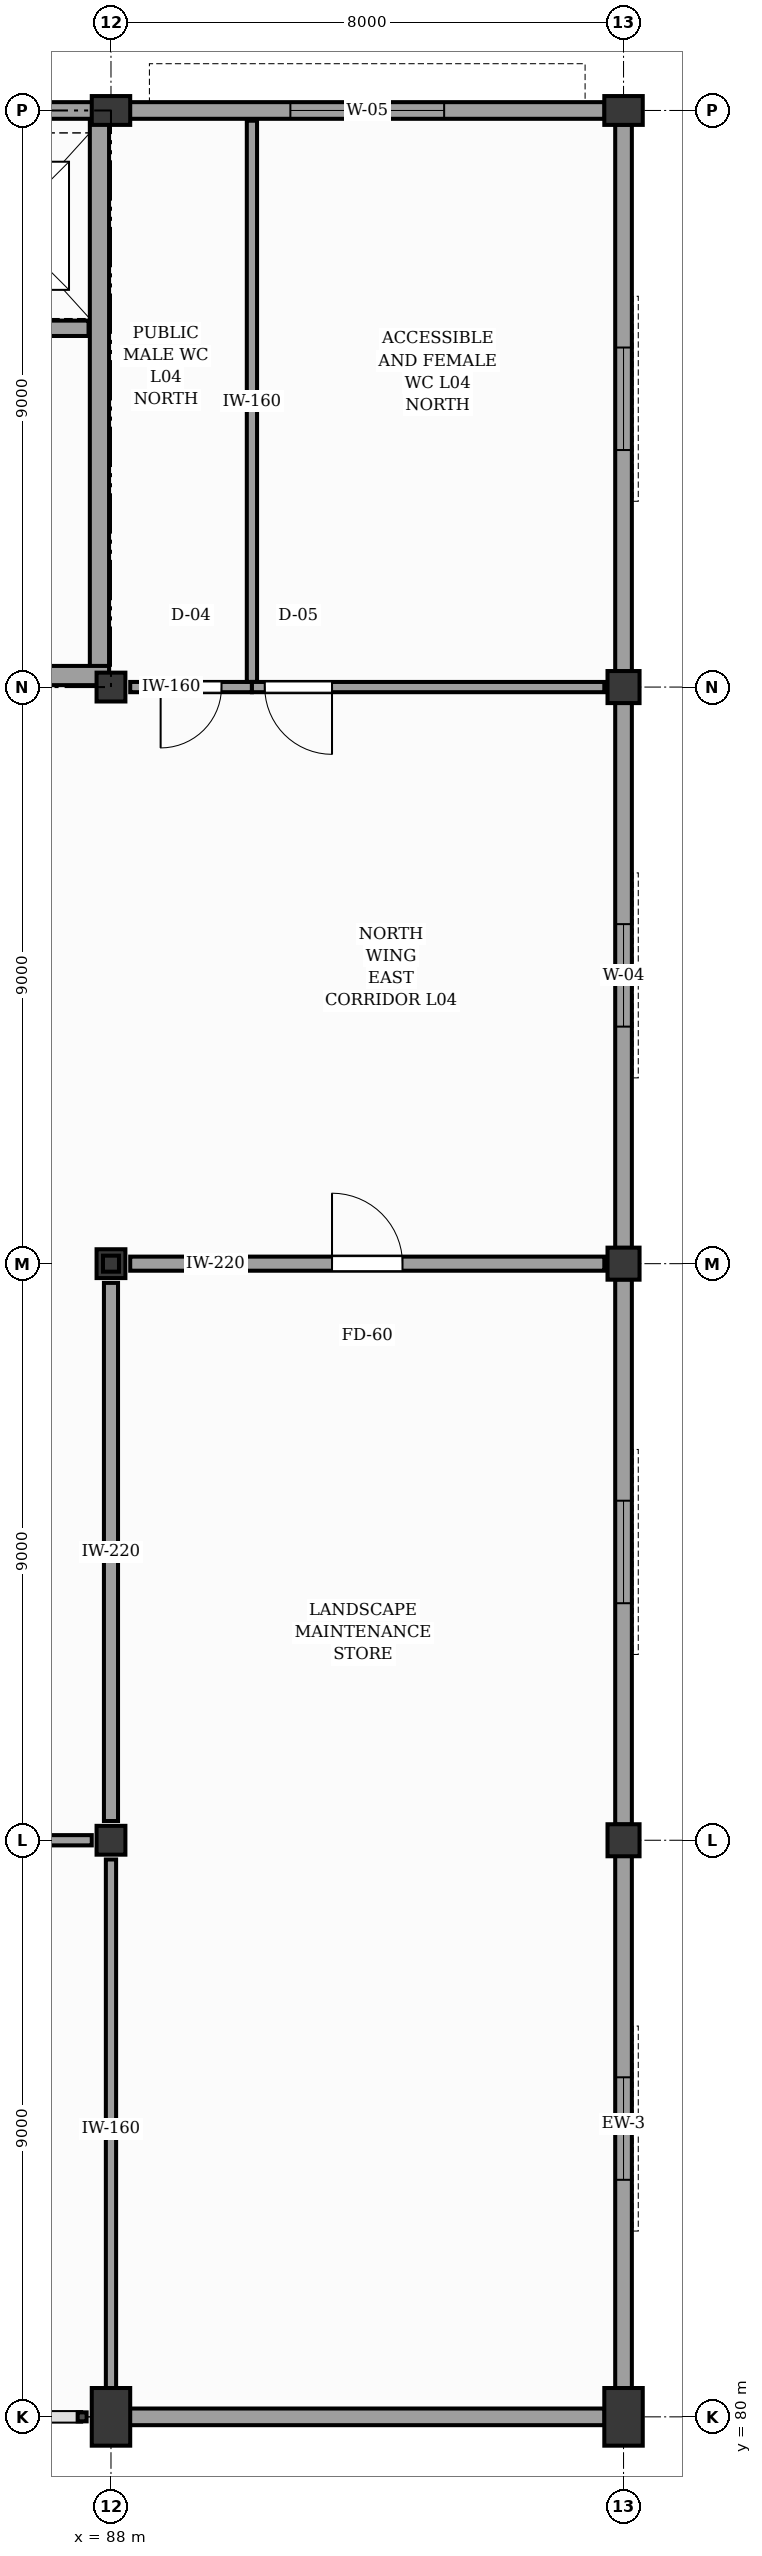
"""IFC4 building model, lengths in metres.
Left out: names, types, materials, properties, quantities, classifications, styles, units other than length and angle.
Written with IfcOpenShell. Run it as: python <this file> out.ifc"""

import sys

from ifc_helpers import new_model, si_unit, direction, frame, frame_2d, origin, origin_2d, place, context, subcontext, project, spatial, rectangle, i_section, extrude, element, fill, save


model = new_model("IFC4")
c1 = context("Model", 3, precision=1e-05, world=origin(), true_north=direction((0.0, 1.0)))
c2 = subcontext(c1, "Body", "Model", "MODEL_VIEW")
j1 = project(units=[si_unit("LENGTHUNIT", "METRE"), si_unit("PLANEANGLEUNIT", "RADIAN")], contexts=[c1])
p1 = place(None, origin())
s1 = spatial("IfcSite", under=j1, at=p1, CompositionType="ELEMENT")
p2 = place(p1, origin())
s2 = spatial("IfcBuilding", under=s1, at=p2, CompositionType="ELEMENT")
p3 = place(p2, frame((0.0, 0.0, 20.4)))
s3 = spatial("IfcBuildingStorey", under=s2, at=p3, CompositionType="ELEMENT", Elevation=20.4)
p4 = place(p3, frame((88.0, 80.0, 0.0), z_axis=(0.0, 0.0, 1.0), x_axis=(1.0, 0.0, 0.0)))
e1 = element("IfcColumn", 1, at=p4, inside=s3, PredefinedType="COLUMN", context=c2, shape_type="SweptSolid", body=[
    extrude(rectangle(XDim=0.6, YDim=0.9, at=origin_2d()), origin(), (0.0, 0.0, 1.0), 4.2),
])
for number, where, z_axis, x_axis in (
    (2, (88.0, 89.0, 0.0), (0.0, 0.0, 1.0), (1.0, 0.0, 0.0)),
    (3, (88.0, 98.0, 0.0), (0.0, 0.0, 1.0), (1.0, 0.0, 0.0)),
    (4, (88.0, 107.0, 0.0), (0.0, 0.0, 1.0), (1.0, 0.0, 0.0)),
):
    element("IfcColumn", number, at=place(p3, frame(where, z_axis=z_axis, x_axis=x_axis)), inside=s3, PredefinedType="COLUMN", context=c2, shape_type="SweptSolid", body=[
        extrude(rectangle(XDim=0.45, YDim=0.45, at=origin_2d()), origin(), (0.0, 0.0, 1.0), 4.2),
    ])
p5 = place(p3, frame((88.0, 116.0, 0.0), z_axis=(0.0, 0.0, 1.0), x_axis=(1.0, 0.0, 0.0)))
e5 = element("IfcColumn", 5, at=p5, inside=s3, PredefinedType="PILASTER", context=c2, shape_type="SweptSolid", body=[
    extrude(rectangle(XDim=0.6, YDim=0.45, at=origin_2d()), origin(), (0.0, 0.0, 1.0), 4.2),
])
p6 = place(p3, frame((96.0, 80.0, 0.0), z_axis=(0.0, 0.0, 1.0), x_axis=(1.0, 0.0, 0.0)))
e6 = element("IfcColumn", 6, at=p6, inside=s3, PredefinedType="COLUMN", context=c2, shape_type="SweptSolid", body=[
    extrude(rectangle(XDim=0.6, YDim=0.9, at=origin_2d()), origin(), (0.0, 0.0, 1.0), 4.2),
])
for number, where, z_axis, x_axis in (
    (7, (96.0, 89.0, 0.0), (0.0, 0.0, 1.0), (1.0, 0.0, 0.0)),
    (8, (96.0, 98.0, 0.0), (0.0, 0.0, 1.0), (1.0, 0.0, 0.0)),
    (9, (96.0, 107.0, 0.0), (0.0, 0.0, 1.0), (1.0, 0.0, 0.0)),
):
    element("IfcColumn", number, at=place(p3, frame(where, z_axis=z_axis, x_axis=x_axis)), inside=s3, PredefinedType="COLUMN", context=c2, shape_type="SweptSolid", body=[
        extrude(rectangle(XDim=0.5, YDim=0.5, at=origin_2d()), origin(), (0.0, 0.0, 1.0), 4.2),
    ])
p7 = place(p3, frame((96.0, 116.0, 0.0), z_axis=(0.0, 0.0, 1.0), x_axis=(1.0, 0.0, 0.0)))
e10 = element("IfcColumn", 10, at=p7, inside=s3, PredefinedType="PILASTER", context=c2, shape_type="SweptSolid", body=[
    extrude(rectangle(XDim=0.6, YDim=0.45, at=origin_2d()), origin(), (0.0, 0.0, 1.0), 4.2),
])
p8 = place(p3, frame((88.0, 98.0, 4.2), z_axis=(0.0, 0.0, 1.0), x_axis=(1.0, 0.0, 0.0)))
e11 = element("IfcColumn", 11, at=p8, inside=s3, PredefinedType="COLUMN", context=c2, shape_type="SweptSolid", body=[
    extrude(i_section(OverallWidth=0.25, OverallDepth=0.25, WebThickness=0.009, FlangeThickness=0.01, FilletRadius=0.01, at=origin_2d()), origin(), (0.0, 0.0, 1.0), 3.5),
])
p9 = place(p3, frame((80.295, 116.0, 0.0), z_axis=(0.0, 0.0, 1.0), x_axis=(1.0, 0.0, 0.0)))
e12 = element("IfcWall", 12, at=p9, inside=s3, PredefinedType="SOLIDWALL", context=c2, shape_type="SweptSolid", body=[
    extrude(rectangle(XDim=7.41, YDim=0.26, at=frame_2d((3.705, 0.0))), origin(), (0.0, 0.0, 1.0), 3.21),
])
p10 = place(p3, frame((88.295, 116.0, 0.0), z_axis=(0.0, 0.0, 1.0), x_axis=(1.0, 0.0, 0.0)))
e13 = element("IfcWall", 13, at=p10, inside=s3, PredefinedType="SOLIDWALL", context=c2, shape_type="SweptSolid", body=[
    extrude(rectangle(XDim=7.41, YDim=0.26, at=frame_2d((3.705, 0.0))), origin(), (0.0, 0.0, 1.0), 3.21),
])
p11 = place(p10, frame((2.505, 0.0, 0.9)))
e14 = element("IfcOpeningElement", 14, at=p11, cuts=e13, PredefinedType="OPENING", context=c2, shape_type="SweptSolid", body=[
    extrude(rectangle(XDim=2.4, YDim=1.99, at=frame_2d((1.2, 0.995))), frame((0.0, 0.14, 0.0), z_axis=(0.0, -1.0, 0.0), x_axis=(1.0, 0.0, 0.0)), (0.0, 0.0, 1.0), 0.28),
])
p12 = place(p3, frame((88.295, 80.0, 0.0), z_axis=(0.0, 0.0, 1.0), x_axis=(1.0, 0.0, 0.0)))
e15 = element("IfcWall", 15, at=p12, inside=s3, PredefinedType="SOLIDWALL", context=c2, shape_type="SweptSolid", body=[
    extrude(rectangle(XDim=7.41, YDim=0.26, at=frame_2d((3.705, 0.0))), origin(), (0.0, 0.0, 1.0), 2.96),
])
p13 = place(p3, frame((96.0, 80.4, 0.0), z_axis=(0.0, 0.0, 1.0), x_axis=(0.0, 1.0, 0.0)))
e16 = element("IfcWall", 16, at=p13, inside=s3, PredefinedType="SOLIDWALL", context=c2, shape_type="SweptSolid", body=[
    extrude(rectangle(XDim=8.355, YDim=0.26, at=frame_2d((4.177, 0.0))), origin(), (0.0, 0.0, 1.0), 2.96),
])
p14 = place(p13, frame((3.3, 0.0, 0.95)))
e17 = element("IfcOpeningElement", 17, at=p14, cuts=e16, PredefinedType="OPENING", context=c2, shape_type="SweptSolid", body=[
    extrude(rectangle(XDim=1.6, YDim=1.87, at=frame_2d((0.8, 0.935))), frame((0.0, 0.14, 0.0), z_axis=(0.0, -1.0, 0.0), x_axis=(1.0, 0.0, 0.0)), (0.0, 0.0, 1.0), 0.28),
])
p15 = place(p3, frame((96.0, 89.245, 0.0), z_axis=(0.0, 0.0, 1.0), x_axis=(0.0, 1.0, 0.0)))
e18 = element("IfcWall", 18, at=p15, inside=s3, PredefinedType="SOLIDWALL", context=c2, shape_type="SweptSolid", body=[
    extrude(rectangle(XDim=8.51, YDim=0.26, at=frame_2d((4.255, 0.0))), origin(), (0.0, 0.0, 1.0), 3.21),
])
p16 = place(p15, frame((3.455, 0.0, 0.95)))
e19 = element("IfcOpeningElement", 19, at=p16, cuts=e18, PredefinedType="OPENING", context=c2, shape_type="SweptSolid", body=[
    extrude(rectangle(XDim=1.6, YDim=2.1, at=frame_2d((0.8, 1.05))), frame((0.0, 0.14, 0.0), z_axis=(0.0, -1.0, 0.0), x_axis=(1.0, 0.0, 0.0)), (0.0, 0.0, 1.0), 0.28),
])
p17 = place(p3, frame((96.0, 98.245, 0.0), z_axis=(0.0, 0.0, 1.0), x_axis=(0.0, 1.0, 0.0)))
e20 = element("IfcWall", 20, at=p17, inside=s3, PredefinedType="SOLIDWALL", context=c2, shape_type="SweptSolid", body=[
    extrude(rectangle(XDim=8.51, YDim=0.26, at=frame_2d((4.255, 0.0))), origin(), (0.0, 0.0, 1.0), 3.21),
])
p18 = place(p17, frame((3.455, 0.0, 0.95)))
e21 = element("IfcOpeningElement", 21, at=p18, cuts=e20, PredefinedType="OPENING", context=c2, shape_type="SweptSolid", body=[
    extrude(rectangle(XDim=1.6, YDim=2.1, at=frame_2d((0.8, 1.05))), frame((0.0, 0.14, 0.0), z_axis=(0.0, -1.0, 0.0), x_axis=(1.0, 0.0, 0.0)), (0.0, 0.0, 1.0), 0.28),
])
p19 = place(p3, frame((96.0, 107.245, 0.0), z_axis=(0.0, 0.0, 1.0), x_axis=(0.0, 1.0, 0.0)))
e22 = element("IfcWall", 22, at=p19, inside=s3, PredefinedType="SOLIDWALL", context=c2, shape_type="SweptSolid", body=[
    extrude(rectangle(XDim=8.535, YDim=0.26, at=frame_2d((4.268, 0.0))), origin(), (0.0, 0.0, 1.0), 3.21),
])
p20 = place(p19, frame((3.455, 0.0, 0.95)))
e23 = element("IfcOpeningElement", 23, at=p20, cuts=e22, PredefinedType="OPENING", context=c2, shape_type="SweptSolid", body=[
    extrude(rectangle(XDim=1.6, YDim=2.1, at=frame_2d((0.8, 1.05))), frame((0.0, 0.14, 0.0), z_axis=(0.0, -1.0, 0.0), x_axis=(1.0, 0.0, 0.0)), (0.0, 0.0, 1.0), 0.28),
])
p21 = place(p3, frame((85.02, 112.6, 0.0), z_axis=(0.0, 0.0, 1.0), x_axis=(1.0, 0.0, 0.0)))
e24 = element("IfcWall", 24, at=p21, inside=s3, PredefinedType="SHEAR", context=c2, shape_type="SweptSolid", body=[
    extrude(rectangle(XDim=2.63, YDim=0.24, at=frame_2d((1.315, 0.0))), origin(), (0.0, 0.0, 1.0), 3.98),
])
p22 = place(p21, frame((0.765, 0.0, 0.0)))
e25 = element("IfcOpeningElement", 25, at=p22, cuts=e24, PredefinedType="OPENING", context=c2, shape_type="SweptSolid", body=[
    extrude(rectangle(XDim=1.1, YDim=2.15, at=frame_2d((0.55, 1.075))), frame((0.0, 0.13, 0.0), z_axis=(0.0, -1.0, 0.0), x_axis=(1.0, 0.0, 0.0)), (0.0, 0.0, 1.0), 0.26),
])
p23 = place(p3, frame((87.82, 107.18, 0.0), z_axis=(0.0, 0.0, 1.0), x_axis=(0.0, 1.0, 0.0)))
e26 = element("IfcWall", 26, at=p23, inside=s3, PredefinedType="SHEAR", context=c2, shape_type="SweptSolid", body=[
    extrude(rectangle(XDim=8.64, YDim=0.3, at=frame_2d((4.32, 0.0))), origin(), (0.0, 0.0, 1.0), 3.98),
])
p24 = place(p3, frame((80.03, 107.18, 0.0), z_axis=(0.0, 0.0, 1.0), x_axis=(1.0, 0.0, 0.0)))
e27 = element("IfcWall", 27, at=p24, inside=s3, PredefinedType="SHEAR", context=c2, shape_type="SweptSolid", body=[
    extrude(rectangle(XDim=7.94, YDim=0.3, at=frame_2d((3.97, 0.0))), origin(), (0.0, 0.0, 1.0), 3.98),
])
p25 = place(p24, frame((5.35, 0.0, 0.0)))
e28 = element("IfcOpeningElement", 28, at=p25, cuts=e27, PredefinedType="OPENING", context=c2, shape_type="SweptSolid", body=[
    extrude(rectangle(XDim=1.6, YDim=2.15, at=frame_2d((0.8, 1.075))), frame((0.0, 0.16, 0.0), z_axis=(0.0, -1.0, 0.0), x_axis=(1.0, 0.0, 0.0)), (0.0, 0.0, 1.0), 0.32),
])
p26 = place(p3, frame((80.3, 89.0, 0.0), z_axis=(0.0, 0.0, 1.0), x_axis=(1.0, 0.0, 0.0)))
e29 = element("IfcWall", 29, at=p26, inside=s3, PredefinedType="PARTITIONING", context=c2, shape_type="SweptSolid", body=[
    extrude(rectangle(XDim=7.4, YDim=0.16, at=frame_2d((3.7, 0.0))), origin(), (0.0, 0.0, 1.0), 3.1),
])
p27 = place(p26, frame((2.8, 0.0, 0.0)))
e30 = element("IfcOpeningElement", 30, at=p27, cuts=e29, PredefinedType="OPENING", context=c2, shape_type="SweptSolid", body=[
    extrude(rectangle(XDim=1.8, YDim=2.25, at=frame_2d((0.9, 1.125))), frame((0.0, 0.09, 0.0), z_axis=(0.0, -1.0, 0.0), x_axis=(1.0, 0.0, 0.0)), (0.0, 0.0, 1.0), 0.18),
])
p28 = place(p3, frame((88.0, 80.3, 0.0), z_axis=(0.0, 0.0, 1.0), x_axis=(0.0, 1.0, 0.0)))
e31 = element("IfcWall", 31, at=p28, inside=s3, PredefinedType="PARTITIONING", context=c2, shape_type="SweptSolid", body=[
    extrude(rectangle(XDim=8.4, YDim=0.16, at=frame_2d((4.2, 0.0))), origin(), (0.0, 0.0, 1.0), 2.96),
])
p29 = place(p3, frame((88.3, 107.0, 0.0), z_axis=(0.0, 0.0, 1.0), x_axis=(1.0, 0.0, 0.0)))
e32 = element("IfcWall", 32, at=p29, inside=s3, PredefinedType="PARTITIONING", context=c2, shape_type="SweptSolid", body=[
    extrude(rectangle(XDim=1.9, YDim=0.16, at=frame_2d((0.95, 0.0))), origin(), (0.0, 0.0, 1.0), 3.1),
])
p30 = place(p29, frame((0.475, 0.0, 0.0)))
e33 = element("IfcOpeningElement", 33, at=p30, cuts=e32, PredefinedType="OPENING", context=c2, shape_type="SweptSolid", body=[
    extrude(rectangle(XDim=0.95, YDim=2.1, at=frame_2d((0.475, 1.05))), frame((0.0, 0.09, 0.0), z_axis=(0.0, -1.0, 0.0), x_axis=(1.0, 0.0, 0.0)), (0.0, 0.0, 1.0), 0.18),
])
p31 = place(p3, frame((90.2, 107.08, 0.0), z_axis=(0.0, 0.0, 1.0), x_axis=(0.0, 1.0, 0.0)))
e34 = element("IfcWall", 34, at=p31, inside=s3, PredefinedType="PARTITIONING", context=c2, shape_type="SweptSolid", body=[
    extrude(rectangle(XDim=8.76, YDim=0.16, at=frame_2d((4.38, 0.0))), origin(), (0.0, 0.0, 1.0), 3.1),
])
p32 = place(p3, frame((90.2, 107.0, 0.0), z_axis=(0.0, 0.0, 1.0), x_axis=(1.0, 0.0, 0.0)))
e35 = element("IfcWall", 35, at=p32, inside=s3, PredefinedType="PARTITIONING", context=c2, shape_type="SweptSolid", body=[
    extrude(rectangle(XDim=5.5, YDim=0.16, at=frame_2d((2.75, 0.0))), origin(), (0.0, 0.0, 1.0), 3.1),
])
p33 = place(p32, frame((0.2, 0.0, 0.0)))
e36 = element("IfcOpeningElement", 36, at=p33, cuts=e35, PredefinedType="OPENING", context=c2, shape_type="SweptSolid", body=[
    extrude(rectangle(XDim=1.05, YDim=2.1, at=frame_2d((0.525, 1.05))), frame((0.0, 0.09, 0.0), z_axis=(0.0, -1.0, 0.0), x_axis=(1.0, 0.0, 0.0)), (0.0, 0.0, 1.0), 0.18),
])
p34 = place(p3, frame((88.3, 98.0, 0.0), z_axis=(0.0, 0.0, 1.0), x_axis=(1.0, 0.0, 0.0)))
e37 = element("IfcWall", 37, at=p34, inside=s3, PredefinedType="SOLIDWALL", context=c2, shape_type="SweptSolid", body=[
    extrude(rectangle(XDim=7.4, YDim=0.22, at=frame_2d((3.7, 0.0))), origin(), (0.0, 0.0, 1.0), 3.1),
])
p35 = place(p34, frame((3.15, 0.0, 0.0)))
e38 = element("IfcOpeningElement", 38, at=p35, cuts=e37, PredefinedType="OPENING", context=c2, shape_type="SweptSolid", body=[
    extrude(rectangle(XDim=1.1, YDim=2.15, at=frame_2d((0.55, 1.075))), frame((0.0, 0.12, 0.0), z_axis=(0.0, -1.0, 0.0), x_axis=(1.0, 0.0, 0.0)), (0.0, 0.0, 1.0), 0.24),
])
p36 = place(p3, frame((88.0, 89.3, 0.0), z_axis=(0.0, 0.0, 1.0), x_axis=(0.0, 1.0, 0.0)))
e39 = element("IfcWall", 39, at=p36, inside=s3, PredefinedType="SOLIDWALL", context=c2, shape_type="SweptSolid", body=[
    extrude(rectangle(XDim=8.4, YDim=0.22, at=frame_2d((4.2, 0.0))), origin(), (0.0, 0.0, 1.0), 3.1),
])
p37 = place(p11, origin())
e40 = element("IfcWindow", 40, at=p37, inside=s3, PartitioningType="SINGLE_PANEL", PredefinedType="WINDOW", context=c2, shape_type="SweptSolid", body=[
    extrude(rectangle(XDim=2.4, YDim=1.99, at=frame_2d((1.2, 0.995))), frame((0.0, 0.03, 0.0), z_axis=(0.0, -1.0, 0.0), x_axis=(1.0, 0.0, 0.0)), (0.0, 0.0, 1.0), 0.06),
])
fill(e14, e40)
p38 = place(p14, origin())
e41 = element("IfcWindow", 41, at=p38, inside=s3, PartitioningType="SINGLE_PANEL", PredefinedType="WINDOW", context=c2, shape_type="SweptSolid", body=[
    extrude(rectangle(XDim=1.6, YDim=1.87, at=frame_2d((0.8, 0.935))), frame((0.0, 0.03, 0.0), z_axis=(0.0, -1.0, 0.0), x_axis=(1.0, 0.0, 0.0)), (0.0, 0.0, 1.0), 0.06),
])
fill(e17, e41)
p39 = place(p16, origin())
e42 = element("IfcWindow", 42, at=p39, inside=s3, PartitioningType="SINGLE_PANEL", PredefinedType="WINDOW", context=c2, shape_type="SweptSolid", body=[
    extrude(rectangle(XDim=1.6, YDim=2.1, at=frame_2d((0.8, 1.05))), frame((0.0, 0.03, 0.0), z_axis=(0.0, -1.0, 0.0), x_axis=(1.0, 0.0, 0.0)), (0.0, 0.0, 1.0), 0.06),
])
fill(e19, e42)
p40 = place(p18, origin())
e43 = element("IfcWindow", 43, at=p40, inside=s3, PartitioningType="SINGLE_PANEL", PredefinedType="WINDOW", context=c2, shape_type="SweptSolid", body=[
    extrude(rectangle(XDim=1.6, YDim=2.1, at=frame_2d((0.8, 1.05))), frame((0.0, 0.03, 0.0), z_axis=(0.0, -1.0, 0.0), x_axis=(1.0, 0.0, 0.0)), (0.0, 0.0, 1.0), 0.06),
])
fill(e21, e43)
p41 = place(p20, origin())
e44 = element("IfcWindow", 44, at=p41, inside=s3, PartitioningType="SINGLE_PANEL", PredefinedType="WINDOW", context=c2, shape_type="SweptSolid", body=[
    extrude(rectangle(XDim=1.6, YDim=2.1, at=frame_2d((0.8, 1.05))), frame((0.0, 0.03, 0.0), z_axis=(0.0, -1.0, 0.0), x_axis=(1.0, 0.0, 0.0)), (0.0, 0.0, 1.0), 0.06),
])
fill(e23, e44)
p42 = place(p30, frame((0.95, 0.0, 0.0), z_axis=(0.0, 0.0, 1.0), x_axis=(-1.0, 0.0, 0.0)))
e45 = element("IfcDoor", 45, at=p42, inside=s3, OperationType="SINGLE_SWING_LEFT", PredefinedType="DOOR", context=c2, shape_type="SweptSolid", body=[
    extrude(rectangle(XDim=0.95, YDim=2.1, at=frame_2d((0.475, 1.05))), frame((0.0, 0.025, 0.0), z_axis=(0.0, -1.0, 0.0), x_axis=(1.0, 0.0, 0.0)), (0.0, 0.0, 1.0), 0.05),
])
fill(e33, e45)
p43 = place(p33, frame((1.05, 0.0, 0.0), z_axis=(0.0, 0.0, 1.0), x_axis=(-1.0, 0.0, 0.0)))
e46 = element("IfcDoor", 46, at=p43, inside=s3, OperationType="SINGLE_SWING_RIGHT", PredefinedType="DOOR", context=c2, shape_type="SweptSolid", body=[
    extrude(rectangle(XDim=1.05, YDim=2.1, at=frame_2d((0.525, 1.05))), frame((0.0, 0.025, 0.0), z_axis=(0.0, -1.0, 0.0), x_axis=(1.0, 0.0, 0.0)), (0.0, 0.0, 1.0), 0.05),
])
fill(e36, e46)
p44 = place(p35, origin())
e47 = element("IfcDoor", 47, at=p44, inside=s3, OperationType="SINGLE_SWING_LEFT", PredefinedType="DOOR", context=c2, shape_type="SweptSolid", body=[
    extrude(rectangle(XDim=1.1, YDim=2.15, at=frame_2d((0.55, 1.075))), frame((0.0, 0.025, 0.0), z_axis=(0.0, -1.0, 0.0), x_axis=(1.0, 0.0, 0.0)), (0.0, 0.0, 1.0), 0.05),
])
fill(e38, e47)
save(model, sys.argv[1])
